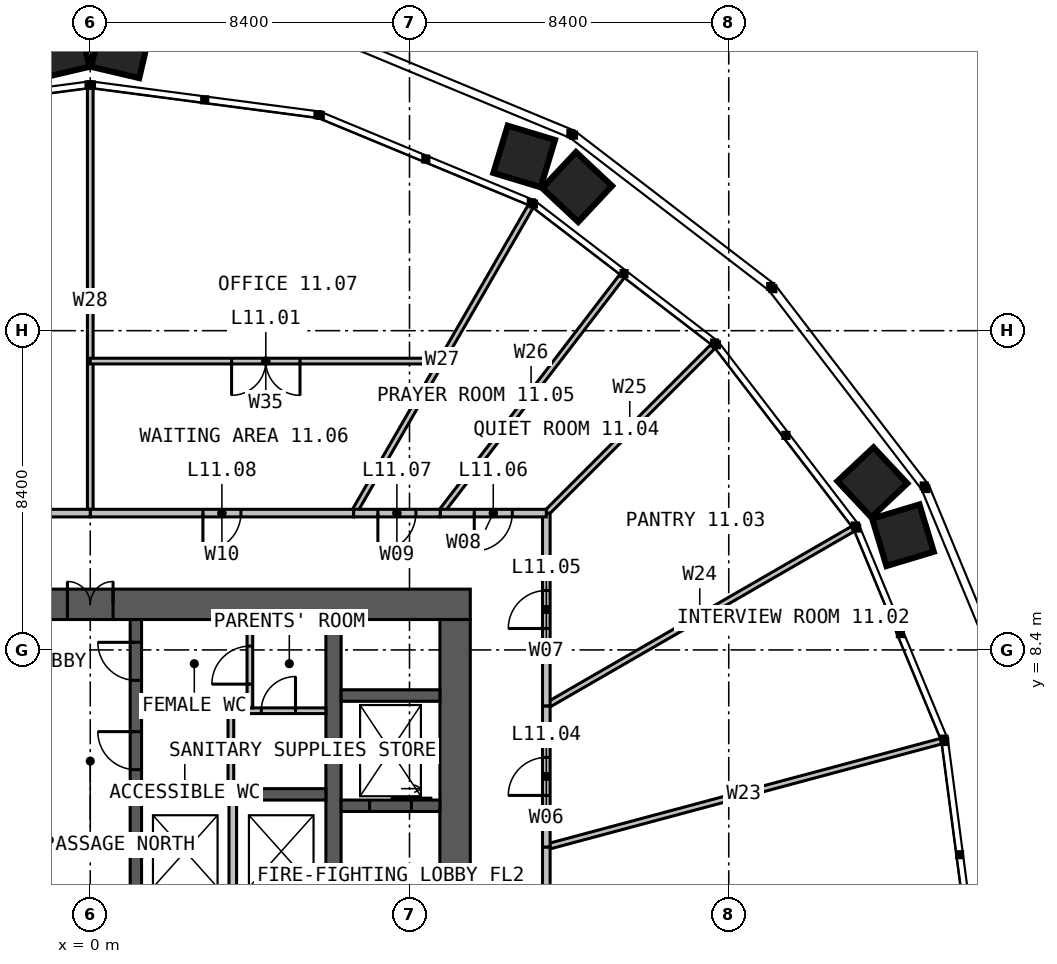
"""IFC4 building model, lengths in metres.
Left out: names, types, materials, properties, quantities, classifications, styles, units other than length and angle.
Written with IfcOpenShell. Run it as: python <this file> out.ifc"""

import sys

from ifc_helpers import new_model, si_unit, direction, frame, frame_2d, origin, place, context, subcontext, project, spatial, rectangle, extrude, element, fill, save


model = new_model("IFC4")
c1 = context("Model", 3, precision=1e-05, world=origin(), true_north=direction((0.0, 1.0)))
c2 = subcontext(c1, "Body", "Model", "MODEL_VIEW")
j1 = project(units=[si_unit("LENGTHUNIT", "METRE"), si_unit("PLANEANGLEUNIT", "RADIAN")], contexts=[c1])
p1 = place(None, origin())
s1 = spatial("IfcSite", under=j1, at=p1, CompositionType="ELEMENT")
p2 = place(p1, origin())
s2 = spatial("IfcBuilding", under=s1, at=p2, CompositionType="ELEMENT")
p3 = place(p2, frame((0.0, 0.0, 49.0)))
s3 = spatial("IfcBuildingStorey", under=s2, at=p3, CompositionType="ELEMENT", Elevation=49.0)
p4 = place(p3, frame((-10.0, 9.6, 0.0), z_axis=(0.0, 0.0, 1.0), x_axis=(1.0, 0.0, 0.0)))
e1 = element("IfcWall", 1, at=p4, inside=s3, PredefinedType="SOLIDWALL", context=c2, shape_type="SweptSolid", body=[
    extrude(rectangle(XDim=20.0, YDim=0.8, at=frame_2d((10.0, 0.0))), origin(), (0.0, 0.0, 1.0), 4.0),
])
p5 = place(p4, frame((9.4, 0.0, 0.0)))
e2 = element("IfcOpeningElement", 2, at=p5, cuts=e1, PredefinedType="OPENING", context=c2, shape_type="SweptSolid", body=[
    extrude(rectangle(XDim=1.2, YDim=2.2, at=frame_2d((0.6, 1.1))), frame((0.0, 0.41, 0.0), z_axis=(0.0, -1.0, 0.0), x_axis=(1.0, 0.0, 0.0)), (0.0, 0.0, 1.0), 0.82),
])
p6 = place(p3, frame((9.6, -9.2, 0.0), z_axis=(0.0, 0.0, 1.0), x_axis=(0.0, 1.0, 0.0)))
e3 = element("IfcWall", 3, at=p6, inside=s3, PredefinedType="SOLIDWALL", context=c2, shape_type="SweptSolid", body=[
    extrude(rectangle(XDim=18.4, YDim=0.8, at=frame_2d((9.2, 0.0))), origin(), (0.0, 0.0, 1.0), 4.0),
])
p7 = place(p3, frame((6.4, 9.2, 0.0), z_axis=(0.0, 0.0, 1.0), x_axis=(0.0, -1.0, 0.0)))
e4 = element("IfcWall", 4, at=p7, inside=s3, PredefinedType="SOLIDWALL", context=c2, shape_type="SweptSolid", body=[
    extrude(rectangle(XDim=18.4, YDim=0.4, at=frame_2d((9.2, 0.0))), origin(), (0.0, 0.0, 1.0), 4.0),
])
p8 = place(p7, frame((8.7, 0.0, 0.0)))
e5 = element("IfcOpeningElement", 5, at=p8, cuts=e4, PredefinedType="OPENING", context=c2, shape_type="SweptSolid", body=[
    extrude(rectangle(XDim=1.0, YDim=2.2, at=frame_2d((0.5, 1.1))), frame((0.0, 0.21, 0.0), z_axis=(0.0, -1.0, 0.0), x_axis=(1.0, 0.0, 0.0)), (0.0, 0.0, 1.0), 0.42),
])
p9 = place(p3, frame((1.35, 4.6, 0.0), z_axis=(0.0, 0.0, 1.0), x_axis=(1.0, 0.0, 0.0)))
e6 = element("IfcWall", 6, at=p9, inside=s3, PredefinedType="SOLIDWALL", context=c2, shape_type="SweptSolid", body=[
    extrude(rectangle(XDim=4.85, YDim=0.3, at=frame_2d((2.425, 0.0))), origin(), (0.0, 0.0, 1.0), 4.0),
])
p10 = place(p3, frame((1.2, 1.45, 0.0), z_axis=(0.0, 0.0, 1.0), x_axis=(0.0, 1.0, 0.0)))
e7 = element("IfcWall", 7, at=p10, inside=s3, PredefinedType="SOLIDWALL", context=c2, shape_type="SweptSolid", body=[
    extrude(rectangle(XDim=7.75, YDim=0.3, at=frame_2d((3.875, 0.0))), origin(), (0.0, 0.0, 1.0), 4.0),
])
p11 = place(p10, frame((3.8, 0.0, 0.0)))
e8 = element("IfcOpeningElement", 8, at=p11, cuts=e7, PredefinedType="OPENING", context=c2, shape_type="SweptSolid", body=[
    extrude(rectangle(XDim=1.0, YDim=2.2, at=frame_2d((0.5, 1.1))), frame((0.0, 0.16, 0.0), z_axis=(0.0, -1.0, 0.0), x_axis=(1.0, 0.0, 0.0)), (0.0, 0.0, 1.0), 0.32),
])
p12 = place(p10, frame((6.15, 0.0, 0.0)))
e9 = element("IfcOpeningElement", 9, at=p12, cuts=e7, PredefinedType="OPENING", context=c2, shape_type="SweptSolid", body=[
    extrude(rectangle(XDim=1.0, YDim=2.2, at=frame_2d((0.5, 1.1))), frame((0.0, 0.16, 0.0), z_axis=(0.0, -1.0, 0.0), x_axis=(1.0, 0.0, 0.0)), (0.0, 0.0, 1.0), 0.32),
])
p13 = place(p3, frame((6.6, 4.3, 0.0), z_axis=(0.0, 0.0, 1.0), x_axis=(1.0, 0.0, 0.0)))
e10 = element("IfcWall", 10, at=p13, inside=s3, PredefinedType="SOLIDWALL", context=c2, shape_type="SweptSolid", body=[
    extrude(rectangle(XDim=2.6, YDim=0.3, at=frame_2d((1.3, 0.0))), origin(), (0.0, 0.0, 1.0), 4.0),
])
p14 = place(p13, frame((0.75, 0.0, 0.0)))
e11 = element("IfcOpeningElement", 11, at=p14, cuts=e10, PredefinedType="OPENING", context=c2, shape_type="SweptSolid", body=[
    extrude(rectangle(XDim=1.1, YDim=2.2, at=frame_2d((0.55, 1.1))), frame((0.0, 0.16, 0.0), z_axis=(0.0, -1.0, 0.0), x_axis=(1.0, 0.0, 0.0)), (0.0, 0.0, 1.0), 0.32),
])
p15 = place(p3, frame((6.6, 7.2, 0.0), z_axis=(0.0, 0.0, 1.0), x_axis=(1.0, 0.0, 0.0)))
e12 = element("IfcWall", 12, at=p15, inside=s3, PredefinedType="SOLIDWALL", context=c2, shape_type="SweptSolid", body=[
    extrude(rectangle(XDim=2.6, YDim=0.3, at=frame_2d((1.3, 0.0))), origin(), (0.0, 0.0, 1.0), 4.0),
])
p16 = place(p3, frame((3.75, 1.75, 0.0), z_axis=(0.0, 0.0, 1.0), x_axis=(0.0, 1.0, 0.0)))
e13 = element("IfcWall", 13, at=p16, inside=s3, PredefinedType="SOLIDWALL", context=c2, shape_type="SweptSolid", body=[
    extrude(rectangle(XDim=2.7, YDim=0.2, at=frame_2d((1.35, 0.0))), origin(), (0.0, 0.0, 1.0), 3.75),
])
p17 = place(p3, frame((1.35, 6.8, 0.0), z_axis=(0.0, 0.0, 1.0), x_axis=(1.0, 0.0, 0.0)))
e14 = element("IfcWall", 14, at=p17, inside=s3, PredefinedType="PARTITIONING", context=c2, shape_type="SweptSolid", body=[
    extrude(rectangle(XDim=4.85, YDim=0.15, at=frame_2d((2.425, 0.0))), origin(), (0.0, 0.0, 1.0), 3.75),
])
p18 = place(p17, frame((3.15, 0.0, 0.0)))
e15 = element("IfcOpeningElement", 15, at=p18, cuts=e14, PredefinedType="OPENING", context=c2, shape_type="SweptSolid", body=[
    extrude(rectangle(XDim=0.9, YDim=2.2, at=frame_2d((0.45, 1.1))), frame((0.0, 0.085, 0.0), z_axis=(0.0, -1.0, 0.0), x_axis=(1.0, 0.0, 0.0)), (0.0, 0.0, 1.0), 0.17),
])
p19 = place(p3, frame((3.7, 4.75, 0.0), z_axis=(0.0, 0.0, 1.0), x_axis=(0.0, 1.0, 0.0)))
e16 = element("IfcWall", 16, at=p19, inside=s3, PredefinedType="PARTITIONING", context=c2, shape_type="SweptSolid", body=[
    extrude(rectangle(XDim=1.975, YDim=0.15, at=frame_2d((0.988, 0.0))), origin(), (0.0, 0.0, 1.0), 3.75),
])
p20 = place(p3, frame((4.2, 6.875, 0.0), z_axis=(0.0, 0.0, 1.0), x_axis=(0.0, 1.0, 0.0)))
e17 = element("IfcWall", 17, at=p20, inside=s3, PredefinedType="PARTITIONING", context=c2, shape_type="SweptSolid", body=[
    extrude(rectangle(XDim=2.325, YDim=0.15, at=frame_2d((1.163, 0.0))), origin(), (0.0, 0.0, 1.0), 3.75),
])
p21 = place(p20, frame((0.625, 0.0, 0.0)))
e18 = element("IfcOpeningElement", 18, at=p21, cuts=e17, PredefinedType="OPENING", context=c2, shape_type="SweptSolid", body=[
    extrude(rectangle(XDim=1.0, YDim=2.2, at=frame_2d((0.5, 1.1))), frame((0.0, 0.085, 0.0), z_axis=(0.0, -1.0, 0.0), x_axis=(1.0, 0.0, 0.0)), (0.0, 0.0, 1.0), 0.17),
])
p22 = place(p3, frame((12.0, 3.215, 0.0), z_axis=(0.0, 0.0, 1.0), x_axis=(0.965923838539, 0.258826463373, 0.0)))
e19 = element("IfcWall", 19, at=p22, inside=s3, PredefinedType="PARTITIONING", context=c2, shape_type="SweptSolid", body=[
    extrude(rectangle(XDim=10.757, YDim=0.15, at=frame_2d((5.378, 0.0))), origin(), (0.0, 0.0, 1.0), 2.79),
])
p23 = place(p3, frame((12.0, 6.928, 0.0), z_axis=(0.0, 0.0, 1.0), x_axis=(0.866028610261, 0.499994446179, 0.0)))
e20 = element("IfcWall", 20, at=p23, inside=s3, PredefinedType="PARTITIONING", context=c2, shape_type="SweptSolid", body=[
    extrude(rectangle(XDim=9.324, YDim=0.15, at=frame_2d((4.662, 0.0))), origin(), (0.0, 0.0, 1.0), 2.79),
])
p24 = place(p3, frame((12.0, 12.0, 0.0), z_axis=(0.0, 0.0, 1.0), x_axis=(0.707106781187, 0.707106781187, 0.0)))
e21 = element("IfcWall", 21, at=p24, inside=s3, PredefinedType="PARTITIONING", context=c2, shape_type="SweptSolid", body=[
    extrude(rectangle(XDim=6.21, YDim=0.15, at=frame_2d((3.105, 0.0))), origin(), (0.0, 0.0, 1.0), 2.79),
])
p25 = place(p3, frame((9.208, 12.0, 0.0), z_axis=(0.0, 0.0, 1.0), x_axis=(0.60875965539, 0.793354701233, 0.0)))
e22 = element("IfcWall", 22, at=p25, inside=s3, PredefinedType="PARTITIONING", context=c2, shape_type="SweptSolid", body=[
    extrude(rectangle(XDim=7.856, YDim=0.15, at=frame_2d((3.928, 0.0))), origin(), (0.0, 0.0, 1.0), 2.79),
])
p26 = place(p3, frame((6.928, 12.0, 0.0), z_axis=(0.0, 0.0, 1.0), x_axis=(0.499994446179, 0.866028610261, 0.0)))
e23 = element("IfcWall", 23, at=p26, inside=s3, PredefinedType="PARTITIONING", context=c2, shape_type="SweptSolid", body=[
    extrude(rectangle(XDim=9.324, YDim=0.15, at=frame_2d((4.662, 0.0))), origin(), (0.0, 0.0, 1.0), 2.79),
])
p27 = place(p3, frame((0.0, 12.0, 0.0), z_axis=(0.0, 0.0, 1.0), x_axis=(0.0, 1.0, 0.0)))
e24 = element("IfcWall", 24, at=p27, inside=s3, PredefinedType="PARTITIONING", context=c2, shape_type="SweptSolid", body=[
    extrude(rectangle(XDim=11.18, YDim=0.15, at=frame_2d((5.59, 0.0))), origin(), (0.0, 0.0, 1.0), 2.79),
])
p28 = place(p3, frame((12.0, -6.928, 0.0), z_axis=(0.0, 0.0, 1.0), x_axis=(0.0, 1.0, 0.0)))
e25 = element("IfcWall", 25, at=p28, inside=s3, PredefinedType="PARTITIONING", context=c2, shape_type="SweptSolid", body=[
    extrude(rectangle(XDim=10.144, YDim=0.2, at=frame_2d((5.072, 0.0))), origin(), (0.0, 0.0, 1.0), 3.8),
])
p29 = place(p28, frame((4.172, 0.0, 0.0)))
e26 = element("IfcOpeningElement", 26, at=p29, cuts=e25, PredefinedType="OPENING", context=c2, shape_type="SweptSolid", body=[
    extrude(rectangle(XDim=1.8, YDim=2.2, at=frame_2d((0.9, 1.1))), frame((0.0, 0.11, 0.0), z_axis=(0.0, -1.0, 0.0), x_axis=(1.0, 0.0, 0.0)), (0.0, 0.0, 1.0), 0.22),
])
p30 = place(p3, frame((12.0, 3.215, 0.0), z_axis=(0.0, 0.0, 1.0), x_axis=(0.0, 1.0, 0.0)))
e27 = element("IfcWall", 27, at=p30, inside=s3, PredefinedType="PARTITIONING", context=c2, shape_type="SweptSolid", body=[
    extrude(rectangle(XDim=3.713, YDim=0.2, at=frame_2d((1.856, 0.0))), origin(), (0.0, 0.0, 1.0), 3.8),
])
p31 = place(p30, frame((1.356, 0.0, 0.0)))
e28 = element("IfcOpeningElement", 28, at=p31, cuts=e27, PredefinedType="OPENING", context=c2, shape_type="SweptSolid", body=[
    extrude(rectangle(XDim=1.0, YDim=2.2, at=frame_2d((0.5, 1.1))), frame((0.0, 0.11, 0.0), z_axis=(0.0, -1.0, 0.0), x_axis=(1.0, 0.0, 0.0)), (0.0, 0.0, 1.0), 0.22),
])
p32 = place(p3, frame((12.0, 6.928, 0.0), z_axis=(0.0, 0.0, 1.0), x_axis=(0.0, 1.0, 0.0)))
e29 = element("IfcWall", 29, at=p32, inside=s3, PredefinedType="PARTITIONING", context=c2, shape_type="SweptSolid", body=[
    extrude(rectangle(XDim=5.072, YDim=0.2, at=frame_2d((2.536, 0.0))), origin(), (0.0, 0.0, 1.0), 3.8),
])
p33 = place(p32, frame((2.036, 0.0, 0.0)))
e30 = element("IfcOpeningElement", 30, at=p33, cuts=e29, PredefinedType="OPENING", context=c2, shape_type="SweptSolid", body=[
    extrude(rectangle(XDim=1.0, YDim=2.2, at=frame_2d((0.5, 1.1))), frame((0.0, 0.11, 0.0), z_axis=(0.0, -1.0, 0.0), x_axis=(1.0, 0.0, 0.0)), (0.0, 0.0, 1.0), 0.22),
])
p34 = place(p3, frame((12.0, 12.0, 0.0), z_axis=(0.0, 0.0, 1.0), x_axis=(-1.0, 0.0, 0.0)))
e31 = element("IfcWall", 31, at=p34, inside=s3, PredefinedType="PARTITIONING", context=c2, shape_type="SweptSolid", body=[
    extrude(rectangle(XDim=2.792, YDim=0.2, at=frame_2d((1.396, 0.0))), origin(), (0.0, 0.0, 1.0), 3.8),
])
p35 = place(p34, frame((0.896, 0.0, 0.0)))
e32 = element("IfcOpeningElement", 32, at=p35, cuts=e31, PredefinedType="OPENING", context=c2, shape_type="SweptSolid", body=[
    extrude(rectangle(XDim=1.0, YDim=2.2, at=frame_2d((0.5, 1.1))), frame((0.0, 0.11, 0.0), z_axis=(0.0, -1.0, 0.0), x_axis=(1.0, 0.0, 0.0)), (0.0, 0.0, 1.0), 0.22),
])
p36 = place(p3, frame((9.208, 12.0, 0.0), z_axis=(0.0, 0.0, 1.0), x_axis=(-1.0, 0.0, 0.0)))
e33 = element("IfcWall", 33, at=p36, inside=s3, PredefinedType="PARTITIONING", context=c2, shape_type="SweptSolid", body=[
    extrude(rectangle(XDim=2.28, YDim=0.2, at=frame_2d((1.14, 0.0))), origin(), (0.0, 0.0, 1.0), 3.8),
])
p37 = place(p36, frame((0.64, 0.0, 0.0)))
e34 = element("IfcOpeningElement", 34, at=p37, cuts=e33, PredefinedType="OPENING", context=c2, shape_type="SweptSolid", body=[
    extrude(rectangle(XDim=1.0, YDim=2.2, at=frame_2d((0.5, 1.1))), frame((0.0, 0.11, 0.0), z_axis=(0.0, -1.0, 0.0), x_axis=(1.0, 0.0, 0.0)), (0.0, 0.0, 1.0), 0.22),
])
p38 = place(p3, frame((9.238, 16.0, 0.0), z_axis=(0.0, 0.0, 1.0), x_axis=(-1.0, 0.0, 0.0)))
e35 = element("IfcWall", 35, at=p38, inside=s3, PredefinedType="PARTITIONING", context=c2, shape_type="SweptSolid", body=[
    extrude(rectangle(XDim=9.238, YDim=0.15, at=frame_2d((4.619, 0.0))), origin(), (0.0, 0.0, 1.0), 2.79),
])
p39 = place(p38, frame((3.719, 0.0, 0.0)))
e36 = element("IfcOpeningElement", 36, at=p39, cuts=e35, PredefinedType="OPENING", context=c2, shape_type="SweptSolid", body=[
    extrude(rectangle(XDim=1.8, YDim=2.2, at=frame_2d((0.9, 1.1))), frame((0.0, 0.085, 0.0), z_axis=(0.0, -1.0, 0.0), x_axis=(1.0, 0.0, 0.0)), (0.0, 0.0, 1.0), 0.17),
])
p40 = place(p3, frame((6.928, 12.0, 0.0), z_axis=(0.0, 0.0, 1.0), x_axis=(-1.0, 0.0, 0.0)))
e37 = element("IfcWall", 37, at=p40, inside=s3, PredefinedType="PARTITIONING", context=c2, shape_type="SweptSolid", body=[
    extrude(rectangle(XDim=6.928, YDim=0.2, at=frame_2d((3.464, 0.0))), origin(), (0.0, 0.0, 1.0), 3.8),
])
p41 = place(p40, frame((2.964, 0.0, 0.0)))
e38 = element("IfcOpeningElement", 38, at=p41, cuts=e37, PredefinedType="OPENING", context=c2, shape_type="SweptSolid", body=[
    extrude(rectangle(XDim=1.0, YDim=2.2, at=frame_2d((0.5, 1.1))), frame((0.0, 0.11, 0.0), z_axis=(0.0, -1.0, 0.0), x_axis=(1.0, 0.0, 0.0)), (0.0, 0.0, 1.0), 0.22),
])
p42 = place(p3, frame((0.0, 12.0, 0.0), z_axis=(0.0, 0.0, 1.0), x_axis=(-1.0, 0.0, 0.0)))
e39 = element("IfcWall", 39, at=p42, inside=s3, PredefinedType="PARTITIONING", context=c2, shape_type="SweptSolid", body=[
    extrude(rectangle(XDim=6.928, YDim=0.2, at=frame_2d((3.464, 0.0))), origin(), (0.0, 0.0, 1.0), 3.8),
])
p43 = place(p42, frame((2.564, 0.0, 0.0)))
e40 = element("IfcOpeningElement", 40, at=p43, cuts=e39, PredefinedType="OPENING", context=c2, shape_type="SweptSolid", body=[
    extrude(rectangle(XDim=1.8, YDim=2.2, at=frame_2d((0.9, 1.1))), frame((0.0, 0.11, 0.0), z_axis=(0.0, -1.0, 0.0), x_axis=(1.0, 0.0, 0.0)), (0.0, 0.0, 1.0), 0.22),
])
p44 = place(p5, origin())
e41 = element("IfcDoor", 41, at=p44, inside=s3, OperationType="DOUBLE_DOOR_SINGLE_SWING", PredefinedType="DOOR", context=c2, shape_type="SweptSolid", body=[
    extrude(rectangle(XDim=1.2, YDim=2.2, at=frame_2d((0.6, 1.1))), frame((0.0, 0.025, 0.0), z_axis=(0.0, -1.0, 0.0), x_axis=(1.0, 0.0, 0.0)), (0.0, 0.0, 1.0), 0.05),
])
fill(e2, e41)
p45 = place(p11, origin())
e42 = element("IfcDoor", 42, at=p45, inside=s3, OperationType="SINGLE_SWING_RIGHT", PredefinedType="DOOR", context=c2, shape_type="SweptSolid", body=[
    extrude(rectangle(XDim=1.0, YDim=2.2, at=frame_2d((0.5, 1.1))), frame((0.0, 0.025, 0.0), z_axis=(0.0, -1.0, 0.0), x_axis=(1.0, 0.0, 0.0)), (0.0, 0.0, 1.0), 0.05),
])
fill(e8, e42)
p46 = place(p12, origin())
e43 = element("IfcDoor", 43, at=p46, inside=s3, OperationType="SINGLE_SWING_RIGHT", PredefinedType="DOOR", context=c2, shape_type="SweptSolid", body=[
    extrude(rectangle(XDim=1.0, YDim=2.2, at=frame_2d((0.5, 1.1))), frame((0.0, 0.025, 0.0), z_axis=(0.0, -1.0, 0.0), x_axis=(1.0, 0.0, 0.0)), (0.0, 0.0, 1.0), 0.05),
])
fill(e9, e43)
p47 = place(p18, origin())
e44 = element("IfcDoor", 44, at=p47, inside=s3, OperationType="SINGLE_SWING_RIGHT", PredefinedType="DOOR", context=c2, shape_type="SweptSolid", body=[
    extrude(rectangle(XDim=0.9, YDim=2.2, at=frame_2d((0.45, 1.1))), frame((0.0, 0.025, 0.0), z_axis=(0.0, -1.0, 0.0), x_axis=(1.0, 0.0, 0.0)), (0.0, 0.0, 1.0), 0.05),
])
fill(e15, e44)
p48 = place(p21, origin())
e45 = element("IfcDoor", 45, at=p48, inside=s3, OperationType="SINGLE_SWING_LEFT", PredefinedType="DOOR", context=c2, shape_type="SweptSolid", body=[
    extrude(rectangle(XDim=1.0, YDim=2.2, at=frame_2d((0.5, 1.1))), frame((0.0, 0.025, 0.0), z_axis=(0.0, -1.0, 0.0), x_axis=(1.0, 0.0, 0.0)), (0.0, 0.0, 1.0), 0.05),
])
fill(e18, e45)
p49 = place(p14, origin())
e46 = element("IfcDoor", 46, at=p49, inside=s3, OperationType="SLIDING_TO_LEFT", PredefinedType="DOOR", context=c2, shape_type="SweptSolid", body=[
    extrude(rectangle(XDim=1.1, YDim=2.2, at=frame_2d((0.55, 1.1))), frame((0.0, 0.025, 0.0), z_axis=(0.0, -1.0, 0.0), x_axis=(1.0, 0.0, 0.0)), (0.0, 0.0, 1.0), 0.05),
])
fill(e11, e46)
p50 = place(p31, origin())
e47 = element("IfcDoor", 47, at=p50, inside=s3, OperationType="SINGLE_SWING_LEFT", PredefinedType="DOOR", context=c2, shape_type="SweptSolid", body=[
    extrude(rectangle(XDim=1.0, YDim=2.2, at=frame_2d((0.5, 1.1))), frame((0.0, 0.025, 0.0), z_axis=(0.0, -1.0, 0.0), x_axis=(1.0, 0.0, 0.0)), (0.0, 0.0, 1.0), 0.05),
])
fill(e28, e47)
p51 = place(p33, origin())
e48 = element("IfcDoor", 48, at=p51, inside=s3, OperationType="SINGLE_SWING_LEFT", PredefinedType="DOOR", context=c2, shape_type="SweptSolid", body=[
    extrude(rectangle(XDim=1.0, YDim=2.2, at=frame_2d((0.5, 1.1))), frame((0.0, 0.025, 0.0), z_axis=(0.0, -1.0, 0.0), x_axis=(1.0, 0.0, 0.0)), (0.0, 0.0, 1.0), 0.05),
])
fill(e30, e48)
p52 = place(p35, origin())
e49 = element("IfcDoor", 49, at=p52, inside=s3, OperationType="SINGLE_SWING_RIGHT", PredefinedType="DOOR", context=c2, shape_type="SweptSolid", body=[
    extrude(rectangle(XDim=1.0, YDim=2.2, at=frame_2d((0.5, 1.1))), frame((0.0, 0.025, 0.0), z_axis=(0.0, -1.0, 0.0), x_axis=(1.0, 0.0, 0.0)), (0.0, 0.0, 1.0), 0.05),
])
fill(e32, e49)
p53 = place(p37, origin())
e50 = element("IfcDoor", 50, at=p53, inside=s3, OperationType="SINGLE_SWING_RIGHT", PredefinedType="DOOR", context=c2, shape_type="SweptSolid", body=[
    extrude(rectangle(XDim=1.0, YDim=2.2, at=frame_2d((0.5, 1.1))), frame((0.0, 0.025, 0.0), z_axis=(0.0, -1.0, 0.0), x_axis=(1.0, 0.0, 0.0)), (0.0, 0.0, 1.0), 0.05),
])
fill(e34, e50)
p54 = place(p39, origin())
e51 = element("IfcDoor", 51, at=p54, inside=s3, OperationType="DOUBLE_DOOR_SINGLE_SWING", PredefinedType="DOOR", context=c2, shape_type="SweptSolid", body=[
    extrude(rectangle(XDim=1.8, YDim=2.2, at=frame_2d((0.9, 1.1))), frame((0.0, 0.025, 0.0), z_axis=(0.0, -1.0, 0.0), x_axis=(1.0, 0.0, 0.0)), (0.0, 0.0, 1.0), 0.05),
])
fill(e36, e51)
p55 = place(p41, origin())
e52 = element("IfcDoor", 52, at=p55, inside=s3, OperationType="SINGLE_SWING_RIGHT", PredefinedType="DOOR", context=c2, shape_type="SweptSolid", body=[
    extrude(rectangle(XDim=1.0, YDim=2.2, at=frame_2d((0.5, 1.1))), frame((0.0, 0.025, 0.0), z_axis=(0.0, -1.0, 0.0), x_axis=(1.0, 0.0, 0.0)), (0.0, 0.0, 1.0), 0.05),
])
fill(e38, e52)
save(model, sys.argv[1])
